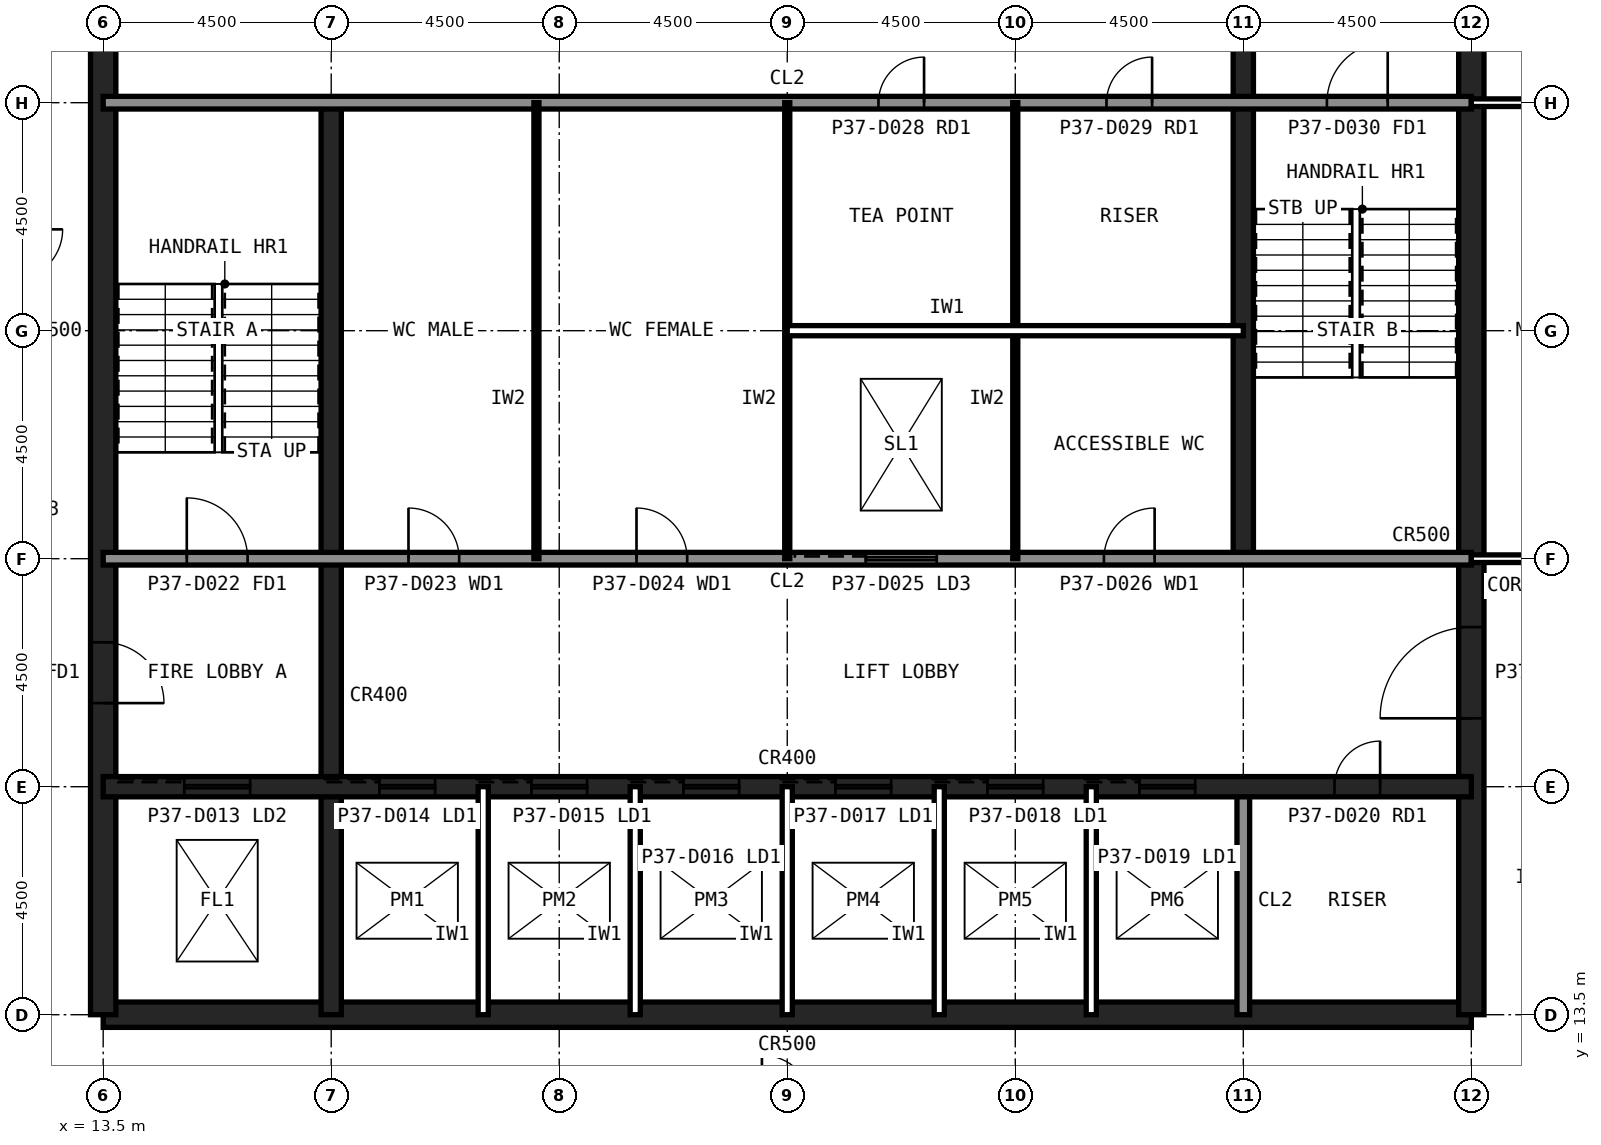
"""IFC4 building model, lengths in metres.
Left out: names, types, materials, properties, quantities, classifications, styles, units other than length and angle.
Written with IfcOpenShell. Run it as: python <this file> out.ifc"""

import sys

from ifc_helpers import new_model, si_unit, direction, frame, frame_2d, origin, place, context, subcontext, project, spatial, rectangle, extrude, element, fill, save


model = new_model("IFC4")
c1 = context("Model", 3, precision=1e-05, world=origin(), true_north=direction((0.0, 1.0)))
c2 = subcontext(c1, "Body", "Model", "MODEL_VIEW")
j1 = project(units=[si_unit("LENGTHUNIT", "METRE"), si_unit("PLANEANGLEUNIT", "RADIAN")], contexts=[c1])
p1 = place(None, origin())
s1 = spatial("IfcSite", under=j1, at=p1, CompositionType="ELEMENT")
p2 = place(p1, origin())
s2 = spatial("IfcBuilding", under=s1, at=p2, CompositionType="ELEMENT")
p3 = place(p2, frame((0.0, 0.0, 159.6)))
s3 = spatial("IfcBuildingStorey", under=s2, at=p3, CompositionType="ELEMENT", Elevation=159.6)
p4 = place(p3, frame((13.5, 13.5, 0.0), z_axis=(0.0, 0.0, 1.0), x_axis=(1.0, 0.0, 0.0)))
e1 = element("IfcWall", 1, at=p4, inside=s3, PredefinedType="SHEAR", context=c2, shape_type="SweptSolid", body=[
    extrude(rectangle(XDim=27.0, YDim=0.5, at=frame_2d((13.5, 0.0))), origin(), (0.0, 0.0, 1.0), 4.0),
])
p5 = place(p3, frame((40.5, 13.5, 0.0), z_axis=(0.0, 0.0, 1.0), x_axis=(0.0, 1.0, 0.0)))
e2 = element("IfcWall", 2, at=p5, inside=s3, PredefinedType="SHEAR", context=c2, shape_type="SweptSolid", body=[
    extrude(rectangle(XDim=27.0, YDim=0.5, at=frame_2d((13.5, 0.0))), origin(), (0.0, 0.0, 1.0), 4.0),
])
p6 = place(p5, frame((5.85, 0.0, 0.0)))
e3 = element("IfcOpeningElement", 3, at=p6, cuts=e2, PredefinedType="OPENING", context=c2, shape_type="SweptSolid", body=[
    extrude(rectangle(XDim=1.8, YDim=2.1, at=frame_2d((0.9, 1.05))), frame((0.0, 0.26, 0.0), z_axis=(0.0, -1.0, 0.0), x_axis=(1.0, 0.0, 0.0)), (0.0, 0.0, 1.0), 0.52),
])
p7 = place(p5, frame((19.65, 0.0, 0.0)))
e4 = element("IfcOpeningElement", 4, at=p7, cuts=e2, PredefinedType="OPENING", context=c2, shape_type="SweptSolid", body=[
    extrude(rectangle(XDim=1.2, YDim=2.1, at=frame_2d((0.6, 1.05))), frame((0.0, 0.26, 0.0), z_axis=(0.0, -1.0, 0.0), x_axis=(1.0, 0.0, 0.0)), (0.0, 0.0, 1.0), 0.52),
])
p8 = place(p3, frame((13.5, 40.5, 0.0), z_axis=(0.0, 0.0, 1.0), x_axis=(0.0, -1.0, 0.0)))
e5 = element("IfcWall", 5, at=p8, inside=s3, PredefinedType="SHEAR", context=c2, shape_type="SweptSolid", body=[
    extrude(rectangle(XDim=27.0, YDim=0.5, at=frame_2d((13.5, 0.0))), origin(), (0.0, 0.0, 1.0), 4.0),
])
p9 = place(p8, frame((19.65, 0.0, 0.0)))
e6 = element("IfcOpeningElement", 6, at=p9, cuts=e5, PredefinedType="OPENING", context=c2, shape_type="SweptSolid", body=[
    extrude(rectangle(XDim=1.2, YDim=2.1, at=frame_2d((0.6, 1.05))), frame((0.0, 0.26, 0.0), z_axis=(0.0, -1.0, 0.0), x_axis=(1.0, 0.0, 0.0)), (0.0, 0.0, 1.0), 0.52),
])
p10 = place(p8, frame((5.85, 0.0, 0.0)))
e7 = element("IfcOpeningElement", 7, at=p10, cuts=e5, PredefinedType="OPENING", context=c2, shape_type="SweptSolid", body=[
    extrude(rectangle(XDim=1.8, YDim=2.1, at=frame_2d((0.9, 1.05))), frame((0.0, 0.26, 0.0), z_axis=(0.0, -1.0, 0.0), x_axis=(1.0, 0.0, 0.0)), (0.0, 0.0, 1.0), 0.52),
])
p11 = place(p3, frame((18.0, 13.5, 0.0), z_axis=(0.0, 0.0, 1.0), x_axis=(0.0, 1.0, 0.0)))
e8 = element("IfcWall", 8, at=p11, inside=s3, PredefinedType="SHEAR", context=c2, shape_type="SweptSolid", body=[
    extrude(rectangle(XDim=18.0, YDim=0.4, at=frame_2d((9.0, 0.0))), origin(), (0.0, 0.0, 1.0), 4.0),
])
p12 = place(p3, frame((36.0, 13.5, 0.0), z_axis=(0.0, 0.0, 1.0), x_axis=(0.0, 1.0, 0.0)))
e9 = element("IfcWall", 9, at=p12, inside=s3, PredefinedType="SOLIDWALL", context=c2, shape_type="SweptSolid", body=[
    extrude(rectangle(XDim=4.5, YDim=0.25, at=frame_2d((2.25, 0.0))), origin(), (0.0, 0.0, 1.0), 3.84),
])
p13 = place(p3, frame((36.0, 22.5, 0.0), z_axis=(0.0, 0.0, 1.0), x_axis=(0.0, 1.0, 0.0)))
e10 = element("IfcWall", 10, at=p13, inside=s3, PredefinedType="SHEAR", context=c2, shape_type="SweptSolid", body=[
    extrude(rectangle(XDim=18.0, YDim=0.4, at=frame_2d((9.0, 0.0))), origin(), (0.0, 0.0, 1.0), 4.0),
])
p14 = place(p3, frame((13.5, 18.0, 0.0), z_axis=(0.0, 0.0, 1.0), x_axis=(1.0, 0.0, 0.0)))
e11 = element("IfcWall", 11, at=p14, inside=s3, PredefinedType="SHEAR", context=c2, shape_type="SweptSolid", body=[
    extrude(rectangle(XDim=27.0, YDim=0.4, at=frame_2d((13.5, 0.0))), origin(), (0.0, 0.0, 1.0), 4.0),
])
p15 = place(p14, frame((24.3, 0.0, 0.0)))
e12 = element("IfcOpeningElement", 12, at=p15, cuts=e11, PredefinedType="OPENING", context=c2, shape_type="SweptSolid", body=[
    extrude(rectangle(XDim=0.9, YDim=2.1, at=frame_2d((0.45, 1.05))), frame((0.0, 0.21, 0.0), z_axis=(0.0, -1.0, 0.0), x_axis=(1.0, 0.0, 0.0)), (0.0, 0.0, 1.0), 0.42),
])
p16 = place(p14, frame((5.45, 0.0, 0.0)))
e13 = element("IfcOpeningElement", 13, at=p16, cuts=e11, PredefinedType="OPENING", context=c2, shape_type="SweptSolid", body=[
    extrude(rectangle(XDim=1.1, YDim=2.1, at=frame_2d((0.55, 1.05))), frame((0.0, 0.21, 0.0), z_axis=(0.0, -1.0, 0.0), x_axis=(1.0, 0.0, 0.0)), (0.0, 0.0, 1.0), 0.42),
])
p17 = place(p14, frame((8.45, 0.0, 0.0)))
e14 = element("IfcOpeningElement", 14, at=p17, cuts=e11, PredefinedType="OPENING", context=c2, shape_type="SweptSolid", body=[
    extrude(rectangle(XDim=1.1, YDim=2.1, at=frame_2d((0.55, 1.05))), frame((0.0, 0.21, 0.0), z_axis=(0.0, -1.0, 0.0), x_axis=(1.0, 0.0, 0.0)), (0.0, 0.0, 1.0), 0.42),
])
p18 = place(p14, frame((11.45, 0.0, 0.0)))
e15 = element("IfcOpeningElement", 15, at=p18, cuts=e11, PredefinedType="OPENING", context=c2, shape_type="SweptSolid", body=[
    extrude(rectangle(XDim=1.1, YDim=2.1, at=frame_2d((0.55, 1.05))), frame((0.0, 0.21, 0.0), z_axis=(0.0, -1.0, 0.0), x_axis=(1.0, 0.0, 0.0)), (0.0, 0.0, 1.0), 0.42),
])
p19 = place(p14, frame((14.45, 0.0, 0.0)))
e16 = element("IfcOpeningElement", 16, at=p19, cuts=e11, PredefinedType="OPENING", context=c2, shape_type="SweptSolid", body=[
    extrude(rectangle(XDim=1.1, YDim=2.1, at=frame_2d((0.55, 1.05))), frame((0.0, 0.21, 0.0), z_axis=(0.0, -1.0, 0.0), x_axis=(1.0, 0.0, 0.0)), (0.0, 0.0, 1.0), 0.42),
])
p20 = place(p14, frame((17.45, 0.0, 0.0)))
e17 = element("IfcOpeningElement", 17, at=p20, cuts=e11, PredefinedType="OPENING", context=c2, shape_type="SweptSolid", body=[
    extrude(rectangle(XDim=1.1, YDim=2.1, at=frame_2d((0.55, 1.05))), frame((0.0, 0.21, 0.0), z_axis=(0.0, -1.0, 0.0), x_axis=(1.0, 0.0, 0.0)), (0.0, 0.0, 1.0), 0.42),
])
p21 = place(p14, frame((20.45, 0.0, 0.0)))
e18 = element("IfcOpeningElement", 18, at=p21, cuts=e11, PredefinedType="OPENING", context=c2, shape_type="SweptSolid", body=[
    extrude(rectangle(XDim=1.1, YDim=2.1, at=frame_2d((0.55, 1.05))), frame((0.0, 0.21, 0.0), z_axis=(0.0, -1.0, 0.0), x_axis=(1.0, 0.0, 0.0)), (0.0, 0.0, 1.0), 0.42),
])
p22 = place(p14, frame((1.6, 0.0, 0.0)))
e19 = element("IfcOpeningElement", 19, at=p22, cuts=e11, PredefinedType="OPENING", context=c2, shape_type="SweptSolid", body=[
    extrude(rectangle(XDim=1.3, YDim=2.2, at=frame_2d((0.65, 1.1))), frame((0.0, 0.21, 0.0), z_axis=(0.0, -1.0, 0.0), x_axis=(1.0, 0.0, 0.0)), (0.0, 0.0, 1.0), 0.42),
])
p23 = place(p3, frame((13.5, 22.5, 0.0), z_axis=(0.0, 0.0, 1.0), x_axis=(1.0, 0.0, 0.0)))
e20 = element("IfcWall", 20, at=p23, inside=s3, PredefinedType="SOLIDWALL", context=c2, shape_type="SweptSolid", body=[
    extrude(rectangle(XDim=27.0, YDim=0.25, at=frame_2d((13.5, 0.0))), origin(), (0.0, 0.0, 1.0), 3.84),
])
p24 = place(p23, frame((1.65, 0.0, 0.0)))
e21 = element("IfcOpeningElement", 21, at=p24, cuts=e20, PredefinedType="OPENING", context=c2, shape_type="SweptSolid", body=[
    extrude(rectangle(XDim=1.2, YDim=2.1, at=frame_2d((0.6, 1.05))), frame((0.0, 0.135, 0.0), z_axis=(0.0, -1.0, 0.0), x_axis=(1.0, 0.0, 0.0)), (0.0, 0.0, 1.0), 0.27),
])
p25 = place(p23, frame((6.025, 0.0, 0.0)))
e22 = element("IfcOpeningElement", 22, at=p25, cuts=e20, PredefinedType="OPENING", context=c2, shape_type="SweptSolid", body=[
    extrude(rectangle(XDim=1.0, YDim=2.1, at=frame_2d((0.5, 1.05))), frame((0.0, 0.135, 0.0), z_axis=(0.0, -1.0, 0.0), x_axis=(1.0, 0.0, 0.0)), (0.0, 0.0, 1.0), 0.27),
])
p26 = place(p23, frame((10.525, 0.0, 0.0)))
e23 = element("IfcOpeningElement", 23, at=p26, cuts=e20, PredefinedType="OPENING", context=c2, shape_type="SweptSolid", body=[
    extrude(rectangle(XDim=1.0, YDim=2.1, at=frame_2d((0.5, 1.05))), frame((0.0, 0.135, 0.0), z_axis=(0.0, -1.0, 0.0), x_axis=(1.0, 0.0, 0.0)), (0.0, 0.0, 1.0), 0.27),
])
p27 = place(p23, frame((19.75, 0.0, 0.0)))
e24 = element("IfcOpeningElement", 24, at=p27, cuts=e20, PredefinedType="OPENING", context=c2, shape_type="SweptSolid", body=[
    extrude(rectangle(XDim=1.0, YDim=2.1, at=frame_2d((0.5, 1.05))), frame((0.0, 0.135, 0.0), z_axis=(0.0, -1.0, 0.0), x_axis=(1.0, 0.0, 0.0)), (0.0, 0.0, 1.0), 0.27),
])
p28 = place(p23, frame((15.05, 0.0, 0.0)))
e25 = element("IfcOpeningElement", 25, at=p28, cuts=e20, PredefinedType="OPENING", context=c2, shape_type="SweptSolid", body=[
    extrude(rectangle(XDim=1.4, YDim=2.4, at=frame_2d((0.7, 1.2))), frame((0.0, 0.135, 0.0), z_axis=(0.0, -1.0, 0.0), x_axis=(1.0, 0.0, 0.0)), (0.0, 0.0, 1.0), 0.27),
])
p29 = place(p3, frame((13.5, 31.5, 0.0), z_axis=(0.0, 0.0, 1.0), x_axis=(1.0, 0.0, 0.0)))
e26 = element("IfcWall", 26, at=p29, inside=s3, PredefinedType="SOLIDWALL", context=c2, shape_type="SweptSolid", body=[
    extrude(rectangle(XDim=27.0, YDim=0.25, at=frame_2d((13.5, 0.0))), origin(), (0.0, 0.0, 1.0), 3.84),
])
p30 = place(p29, frame((24.15, 0.0, 0.0)))
e27 = element("IfcOpeningElement", 27, at=p30, cuts=e26, PredefinedType="OPENING", context=c2, shape_type="SweptSolid", body=[
    extrude(rectangle(XDim=1.2, YDim=2.1, at=frame_2d((0.6, 1.05))), frame((0.0, 0.135, 0.0), z_axis=(0.0, -1.0, 0.0), x_axis=(1.0, 0.0, 0.0)), (0.0, 0.0, 1.0), 0.27),
])
p31 = place(p29, frame((15.3, 0.0, 0.0)))
e28 = element("IfcOpeningElement", 28, at=p31, cuts=e26, PredefinedType="OPENING", context=c2, shape_type="SweptSolid", body=[
    extrude(rectangle(XDim=0.9, YDim=2.1, at=frame_2d((0.45, 1.05))), frame((0.0, 0.135, 0.0), z_axis=(0.0, -1.0, 0.0), x_axis=(1.0, 0.0, 0.0)), (0.0, 0.0, 1.0), 0.27),
])
p32 = place(p29, frame((19.8, 0.0, 0.0)))
e29 = element("IfcOpeningElement", 29, at=p32, cuts=e26, PredefinedType="OPENING", context=c2, shape_type="SweptSolid", body=[
    extrude(rectangle(XDim=0.9, YDim=2.1, at=frame_2d((0.45, 1.05))), frame((0.0, 0.135, 0.0), z_axis=(0.0, -1.0, 0.0), x_axis=(1.0, 0.0, 0.0)), (0.0, 0.0, 1.0), 0.27),
])
for number, where, z_axis, x_axis in (
    (30, (21.0, 13.5, 0.0), (0.0, 0.0, 1.0), (0.0, 1.0, 0.0)),
    (31, (24.0, 13.5, 0.0), (0.0, 0.0, 1.0), (0.0, 1.0, 0.0)),
    (32, (27.0, 13.5, 0.0), (0.0, 0.0, 1.0), (0.0, 1.0, 0.0)),
    (33, (30.0, 13.5, 0.0), (0.0, 0.0, 1.0), (0.0, 1.0, 0.0)),
    (34, (33.0, 13.5, 0.0), (0.0, 0.0, 1.0), (0.0, 1.0, 0.0)),
):
    element("IfcWall", number, at=place(p3, frame(where, z_axis=z_axis, x_axis=x_axis)), inside=s3, PredefinedType="PARTITIONING", context=c2, shape_type="SweptSolid", body=[
        extrude(rectangle(XDim=4.5, YDim=0.2, at=frame_2d((2.25, 0.0))), origin(), (0.0, 0.0, 1.0), 3.84),
    ])
for number, where, z_axis, x_axis in (
    (35, (22.05, 22.5, 0.0), (0.0, 0.0, 1.0), (0.0, 1.0, 0.0)),
    (36, (27.0, 22.5, 0.0), (0.0, 0.0, 1.0), (0.0, 1.0, 0.0)),
    (37, (31.5, 22.5, 0.0), (0.0, 0.0, 1.0), (0.0, 1.0, 0.0)),
):
    element("IfcWall", number, at=place(p3, frame(where, z_axis=z_axis, x_axis=x_axis)), inside=s3, PredefinedType="PLUMBINGWALL", context=c2, shape_type="SweptSolid", body=[
        extrude(rectangle(XDim=9.0, YDim=0.1, at=frame_2d((4.5, 0.0))), origin(), (0.0, 0.0, 1.0), 3.84),
    ])
p33 = place(p3, frame((27.0, 27.0, 0.0), z_axis=(0.0, 0.0, 1.0), x_axis=(1.0, 0.0, 0.0)))
e38 = element("IfcWall", 38, at=p33, inside=s3, PredefinedType="PARTITIONING", context=c2, shape_type="SweptSolid", body=[
    extrude(rectangle(XDim=9.0, YDim=0.2, at=frame_2d((4.5, 0.0))), origin(), (0.0, 0.0, 1.0), 3.84),
])
p34 = place(p3, frame((40.5, 22.5, 0.0), z_axis=(0.0, 0.0, 1.0), x_axis=(1.0, 0.0, 0.0)))
e39 = element("IfcWall", 39, at=p34, inside=s3, PredefinedType="PARTITIONING", context=c2, shape_type="SweptSolid", body=[
    extrude(rectangle(XDim=4.5, YDim=0.15, at=frame_2d((2.25, 0.0))), origin(), (0.0, 0.0, 1.0), 2.989),
])
p35 = place(p3, frame((45.0, 31.5, 0.0), z_axis=(0.0, 0.0, 1.0), x_axis=(-1.0, 0.0, 0.0)))
e40 = element("IfcWall", 40, at=p35, inside=s3, PredefinedType="PARTITIONING", context=c2, shape_type="SweptSolid", body=[
    extrude(rectangle(XDim=4.5, YDim=0.15, at=frame_2d((2.25, 0.0))), origin(), (0.0, 0.0, 1.0), 2.989),
])
p36 = place(p35, frame((1.75, 0.0, 0.0)))
e41 = element("IfcOpeningElement", 41, at=p36, cuts=e40, PredefinedType="OPENING", context=c2, shape_type="SweptSolid", body=[
    extrude(rectangle(XDim=1.0, YDim=2.1, at=frame_2d((0.5, 1.05))), frame((0.0, 0.085, 0.0), z_axis=(0.0, -1.0, 0.0), x_axis=(1.0, 0.0, 0.0)), (0.0, 0.0, 1.0), 0.17),
])
p37 = place(p9, origin())
e42 = element("IfcDoor", 42, at=p37, inside=s3, OperationType="SINGLE_SWING_RIGHT", PredefinedType="DOOR", context=c2, shape_type="SweptSolid", body=[
    extrude(rectangle(XDim=1.2, YDim=2.1, at=frame_2d((0.6, 1.05))), frame((0.0, 0.025, 0.0), z_axis=(0.0, -1.0, 0.0), x_axis=(1.0, 0.0, 0.0)), (0.0, 0.0, 1.0), 0.05),
])
fill(e6, e42)
p38 = place(p6, origin())
e43 = element("IfcDoor", 43, at=p38, inside=s3, OperationType="SINGLE_SWING_LEFT", PredefinedType="DOOR", context=c2, shape_type="SweptSolid", body=[
    extrude(rectangle(XDim=1.8, YDim=2.1, at=frame_2d((0.9, 1.05))), frame((0.0, 0.025, 0.0), z_axis=(0.0, -1.0, 0.0), x_axis=(1.0, 0.0, 0.0)), (0.0, 0.0, 1.0), 0.05),
])
fill(e3, e43)
p39 = place(p24, origin())
e44 = element("IfcDoor", 44, at=p39, inside=s3, OperationType="SINGLE_SWING_LEFT", PredefinedType="DOOR", context=c2, shape_type="SweptSolid", body=[
    extrude(rectangle(XDim=1.2, YDim=2.1, at=frame_2d((0.6, 1.05))), frame((0.0, 0.025, 0.0), z_axis=(0.0, -1.0, 0.0), x_axis=(1.0, 0.0, 0.0)), (0.0, 0.0, 1.0), 0.05),
])
fill(e21, e44)
p40 = place(p30, origin())
e45 = element("IfcDoor", 45, at=p40, inside=s3, OperationType="SINGLE_SWING_RIGHT", PredefinedType="DOOR", context=c2, shape_type="SweptSolid", body=[
    extrude(rectangle(XDim=1.2, YDim=2.1, at=frame_2d((0.6, 1.05))), frame((0.0, 0.025, 0.0), z_axis=(0.0, -1.0, 0.0), x_axis=(1.0, 0.0, 0.0)), (0.0, 0.0, 1.0), 0.05),
])
fill(e27, e45)
p41 = place(p25, origin())
e46 = element("IfcDoor", 46, at=p41, inside=s3, OperationType="SINGLE_SWING_LEFT", PredefinedType="DOOR", context=c2, shape_type="SweptSolid", body=[
    extrude(rectangle(XDim=1.0, YDim=2.1, at=frame_2d((0.5, 1.05))), frame((0.0, 0.025, 0.0), z_axis=(0.0, -1.0, 0.0), x_axis=(1.0, 0.0, 0.0)), (0.0, 0.0, 1.0), 0.05),
])
fill(e22, e46)
p42 = place(p26, origin())
e47 = element("IfcDoor", 47, at=p42, inside=s3, OperationType="SINGLE_SWING_LEFT", PredefinedType="DOOR", context=c2, shape_type="SweptSolid", body=[
    extrude(rectangle(XDim=1.0, YDim=2.1, at=frame_2d((0.5, 1.05))), frame((0.0, 0.025, 0.0), z_axis=(0.0, -1.0, 0.0), x_axis=(1.0, 0.0, 0.0)), (0.0, 0.0, 1.0), 0.05),
])
fill(e23, e47)
p43 = place(p27, origin())
e48 = element("IfcDoor", 48, at=p43, inside=s3, OperationType="SINGLE_SWING_RIGHT", PredefinedType="DOOR", context=c2, shape_type="SweptSolid", body=[
    extrude(rectangle(XDim=1.0, YDim=2.1, at=frame_2d((0.5, 1.05))), frame((0.0, 0.025, 0.0), z_axis=(0.0, -1.0, 0.0), x_axis=(1.0, 0.0, 0.0)), (0.0, 0.0, 1.0), 0.05),
])
fill(e24, e48)
p44 = place(p31, origin())
e49 = element("IfcDoor", 49, at=p44, inside=s3, OperationType="SINGLE_SWING_RIGHT", PredefinedType="DOOR", context=c2, shape_type="SweptSolid", body=[
    extrude(rectangle(XDim=0.9, YDim=2.1, at=frame_2d((0.45, 1.05))), frame((0.0, 0.025, 0.0), z_axis=(0.0, -1.0, 0.0), x_axis=(1.0, 0.0, 0.0)), (0.0, 0.0, 1.0), 0.05),
])
fill(e28, e49)
p45 = place(p32, origin())
e50 = element("IfcDoor", 50, at=p45, inside=s3, OperationType="SINGLE_SWING_RIGHT", PredefinedType="DOOR", context=c2, shape_type="SweptSolid", body=[
    extrude(rectangle(XDim=0.9, YDim=2.1, at=frame_2d((0.45, 1.05))), frame((0.0, 0.025, 0.0), z_axis=(0.0, -1.0, 0.0), x_axis=(1.0, 0.0, 0.0)), (0.0, 0.0, 1.0), 0.05),
])
fill(e29, e50)
p46 = place(p15, origin())
e51 = element("IfcDoor", 51, at=p46, inside=s3, OperationType="SINGLE_SWING_RIGHT", PredefinedType="DOOR", context=c2, shape_type="SweptSolid", body=[
    extrude(rectangle(XDim=0.9, YDim=2.1, at=frame_2d((0.45, 1.05))), frame((0.0, 0.025, 0.0), z_axis=(0.0, -1.0, 0.0), x_axis=(1.0, 0.0, 0.0)), (0.0, 0.0, 1.0), 0.05),
])
fill(e12, e51)
p47 = place(p16, origin())
e52 = element("IfcDoor", 52, at=p47, inside=s3, OperationType="SLIDING_TO_LEFT", PredefinedType="DOOR", context=c2, shape_type="SweptSolid", body=[
    extrude(rectangle(XDim=1.1, YDim=2.1, at=frame_2d((0.55, 1.05))), frame((0.0, 0.025, 0.0), z_axis=(0.0, -1.0, 0.0), x_axis=(1.0, 0.0, 0.0)), (0.0, 0.0, 1.0), 0.05),
])
fill(e13, e52)
p48 = place(p17, origin())
e53 = element("IfcDoor", 53, at=p48, inside=s3, OperationType="SLIDING_TO_LEFT", PredefinedType="DOOR", context=c2, shape_type="SweptSolid", body=[
    extrude(rectangle(XDim=1.1, YDim=2.1, at=frame_2d((0.55, 1.05))), frame((0.0, 0.025, 0.0), z_axis=(0.0, -1.0, 0.0), x_axis=(1.0, 0.0, 0.0)), (0.0, 0.0, 1.0), 0.05),
])
fill(e14, e53)
p49 = place(p18, origin())
e54 = element("IfcDoor", 54, at=p49, inside=s3, OperationType="SLIDING_TO_LEFT", PredefinedType="DOOR", context=c2, shape_type="SweptSolid", body=[
    extrude(rectangle(XDim=1.1, YDim=2.1, at=frame_2d((0.55, 1.05))), frame((0.0, 0.025, 0.0), z_axis=(0.0, -1.0, 0.0), x_axis=(1.0, 0.0, 0.0)), (0.0, 0.0, 1.0), 0.05),
])
fill(e15, e54)
p50 = place(p19, origin())
e55 = element("IfcDoor", 55, at=p50, inside=s3, OperationType="SLIDING_TO_LEFT", PredefinedType="DOOR", context=c2, shape_type="SweptSolid", body=[
    extrude(rectangle(XDim=1.1, YDim=2.1, at=frame_2d((0.55, 1.05))), frame((0.0, 0.025, 0.0), z_axis=(0.0, -1.0, 0.0), x_axis=(1.0, 0.0, 0.0)), (0.0, 0.0, 1.0), 0.05),
])
fill(e16, e55)
p51 = place(p20, origin())
e56 = element("IfcDoor", 56, at=p51, inside=s3, OperationType="SLIDING_TO_LEFT", PredefinedType="DOOR", context=c2, shape_type="SweptSolid", body=[
    extrude(rectangle(XDim=1.1, YDim=2.1, at=frame_2d((0.55, 1.05))), frame((0.0, 0.025, 0.0), z_axis=(0.0, -1.0, 0.0), x_axis=(1.0, 0.0, 0.0)), (0.0, 0.0, 1.0), 0.05),
])
fill(e17, e56)
p52 = place(p21, origin())
e57 = element("IfcDoor", 57, at=p52, inside=s3, OperationType="SLIDING_TO_LEFT", PredefinedType="DOOR", context=c2, shape_type="SweptSolid", body=[
    extrude(rectangle(XDim=1.1, YDim=2.1, at=frame_2d((0.55, 1.05))), frame((0.0, 0.025, 0.0), z_axis=(0.0, -1.0, 0.0), x_axis=(1.0, 0.0, 0.0)), (0.0, 0.0, 1.0), 0.05),
])
fill(e18, e57)
p53 = place(p22, origin())
e58 = element("IfcDoor", 58, at=p53, inside=s3, OperationType="SLIDING_TO_LEFT", PredefinedType="DOOR", context=c2, shape_type="SweptSolid", body=[
    extrude(rectangle(XDim=1.3, YDim=2.2, at=frame_2d((0.65, 1.1))), frame((0.0, 0.025, 0.0), z_axis=(0.0, -1.0, 0.0), x_axis=(1.0, 0.0, 0.0)), (0.0, 0.0, 1.0), 0.05),
])
fill(e19, e58)
p54 = place(p28, origin())
e59 = element("IfcDoor", 59, at=p54, inside=s3, OperationType="SLIDING_TO_LEFT", PredefinedType="DOOR", context=c2, shape_type="SweptSolid", body=[
    extrude(rectangle(XDim=1.4, YDim=2.4, at=frame_2d((0.7, 1.2))), frame((0.0, 0.025, 0.0), z_axis=(0.0, -1.0, 0.0), x_axis=(1.0, 0.0, 0.0)), (0.0, 0.0, 1.0), 0.05),
])
fill(e25, e59)
save(model, sys.argv[1])
